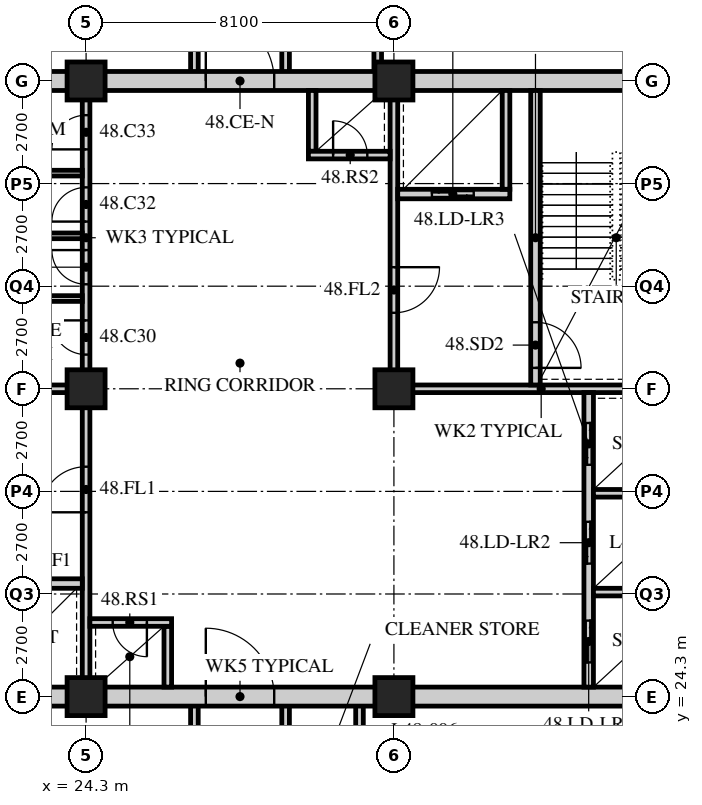
"""IFC4 building model, lengths in metres.
Left out: names, types, materials, properties, quantities, classifications, styles, units other than length and angle.
Written with IfcOpenShell. Run it as: python <this file> out.ifc"""

import sys

from ifc_helpers import new_model, si_unit, direction, frame, frame_2d, origin, origin_2d, place, context, subcontext, project, spatial, rectangle, hollow_rectangle, extrude, element, fill, save


model = new_model("IFC4")
c1 = context("Model", 3, precision=1e-05, world=origin(), true_north=direction((0.0, 1.0)))
c2 = subcontext(c1, "Body", "Model", "MODEL_VIEW")
j1 = project(units=[si_unit("LENGTHUNIT", "METRE"), si_unit("PLANEANGLEUNIT", "RADIAN")], contexts=[c1])
p1 = place(None, origin())
s1 = spatial("IfcSite", under=j1, at=p1, CompositionType="ELEMENT")
p2 = place(p1, origin())
s2 = spatial("IfcBuilding", under=s1, at=p2, CompositionType="ELEMENT")
p3 = place(p2, frame((0.0, 0.0, 188.4)))
s3 = spatial("IfcBuildingStorey", under=s2, at=p3, CompositionType="ELEMENT", Elevation=188.4)
for number, where, z_axis, x_axis in (
    (1, (24.3, 24.3, 0.0), (0.0, 0.0, 1.0), (1.0, 0.0, 0.0)),
    (2, (24.3, 32.4, 0.0), (0.0, 0.0, 1.0), (1.0, 0.0, 0.0)),
    (3, (24.3, 40.5, 0.0), (0.0, 0.0, 1.0), (1.0, 0.0, 0.0)),
    (4, (32.4, 24.3, 0.0), (0.0, 0.0, 1.0), (1.0, 0.0, 0.0)),
    (5, (32.4, 32.4, 0.0), (0.0, 0.0, 1.0), (1.0, 0.0, 0.0)),
    (6, (32.4, 40.5, 0.0), (0.0, 0.0, 1.0), (1.0, 0.0, 0.0)),
):
    element("IfcColumn", number, at=place(p3, frame(where, z_axis=z_axis, x_axis=x_axis)), inside=s3, PredefinedType="COLUMN", context=c2, shape_type="SweptSolid", body=[
        extrude(hollow_rectangle(XDim=1.0, YDim=1.0, WallThickness=0.1, at=origin_2d()), origin(), (0.0, 0.0, 1.0), 3.6),
    ])
for number, where, z_axis, x_axis in (
    (7, (31.494, 20.7, 0.0), (0.0, 0.0, 1.0), (0.0, 1.0, 0.0)),
    (8, (27.15, 20.7, 0.0), (0.0, 0.0, 1.0), (0.0, 1.0, 0.0)),
    (9, (29.55, 20.7, 0.0), (0.0, 0.0, 1.0), (0.0, 1.0, 0.0)),
):
    element("IfcWall", number, at=place(p3, frame(where, z_axis=z_axis, x_axis=x_axis)), inside=s3, PredefinedType="SOLIDWALL", context=c2, shape_type="SweptSolid", body=[
        extrude(rectangle(XDim=3.6, YDim=0.2, at=frame_2d((1.8, 0.0))), origin(), (0.0, 0.0, 1.0), 3.39),
    ])
p4 = place(p3, frame((31.974, 45.45, 0.0), z_axis=(0.0, 0.0, 1.0), x_axis=(0.0, -1.0, 0.0)))
e10 = element("IfcWall", 10, at=p4, inside=s3, PredefinedType="SOLIDWALL", context=c2, shape_type="SweptSolid", body=[
    extrude(rectangle(XDim=4.95, YDim=0.2, at=frame_2d((2.475, 0.0))), origin(), (0.0, 0.0, 1.0), 2.69),
])
for number, where, z_axis, x_axis in (
    (11, (27.15, 40.5, 0.0), (0.0, 0.0, 1.0), (0.0, 1.0, 0.0)),
    (12, (29.55, 40.5, 0.0), (0.0, 0.0, 1.0), (0.0, 1.0, 0.0)),
):
    element("IfcWall", number, at=place(p3, frame(where, z_axis=z_axis, x_axis=x_axis)), inside=s3, PredefinedType="SOLIDWALL", context=c2, shape_type="SweptSolid", body=[
        extrude(rectangle(XDim=4.95, YDim=0.2, at=frame_2d((2.475, 0.0))), origin(), (0.0, 0.0, 1.0), 3.39),
    ])
p5 = place(p3, frame((15.95, 24.3, 0.0), z_axis=(0.0, 0.0, 1.0), x_axis=(1.0, 0.0, 0.0)))
e13 = element("IfcWall", 13, at=p5, inside=s3, PredefinedType="SOLIDWALL", context=c2, shape_type="SweptSolid", body=[
    extrude(rectangle(XDim=24.8, YDim=0.5, at=frame_2d((12.4, 0.0))), origin(), (0.0, 0.0, 1.0), 2.74),
])
p6 = place(p5, frame((11.5, 0.0, 0.0)))
e14 = element("IfcOpeningElement", 14, at=p6, cuts=e13, PredefinedType="OPENING", context=c2, shape_type="SweptSolid", body=[
    extrude(rectangle(XDim=1.8, YDim=2.4, at=frame_2d((0.9, 1.2))), frame((0.0, 0.26, 0.0), z_axis=(0.0, -1.0, 0.0), x_axis=(1.0, 0.0, 0.0)), (0.0, 0.0, 1.0), 0.52),
])
p7 = place(p3, frame((15.95, 40.5, 0.0), z_axis=(0.0, 0.0, 1.0), x_axis=(1.0, 0.0, 0.0)))
e15 = element("IfcWall", 15, at=p7, inside=s3, PredefinedType="SOLIDWALL", context=c2, shape_type="SweptSolid", body=[
    extrude(rectangle(XDim=24.8, YDim=0.5, at=frame_2d((12.4, 0.0))), origin(), (0.0, 0.0, 1.0), 2.74),
])
p8 = place(p7, frame((11.5, 0.0, 0.0)))
e16 = element("IfcOpeningElement", 16, at=p8, cuts=e15, PredefinedType="OPENING", context=c2, shape_type="SweptSolid", body=[
    extrude(rectangle(XDim=1.8, YDim=2.4, at=frame_2d((0.9, 1.2))), frame((0.0, 0.26, 0.0), z_axis=(0.0, -1.0, 0.0), x_axis=(1.0, 0.0, 0.0)), (0.0, 0.0, 1.0), 0.52),
])
p9 = place(p3, frame((16.45, 32.4, 0.0), z_axis=(0.0, 0.0, 1.0), x_axis=(1.0, 0.0, 0.0)))
e17 = element("IfcWall", 17, at=p9, inside=s3, PredefinedType="SOLIDWALL", context=c2, shape_type="SweptSolid", body=[
    extrude(rectangle(XDim=7.95, YDim=0.2, at=frame_2d((3.975, 0.0))), origin(), (0.0, 0.0, 1.0), 2.778),
])
p10 = place(p3, frame((24.3, 24.55, 0.0), z_axis=(0.0, 0.0, 1.0), x_axis=(0.0, 1.0, 0.0)))
e18 = element("IfcWall", 18, at=p10, inside=s3, PredefinedType="SOLIDWALL", context=c2, shape_type="SweptSolid", body=[
    extrude(rectangle(XDim=7.75, YDim=0.2, at=frame_2d((3.875, 0.0))), origin(), (0.0, 0.0, 1.0), 2.778),
])
p11 = place(p10, frame((4.6, 0.0, 0.0)))
e19 = element("IfcOpeningElement", 19, at=p11, cuts=e18, PredefinedType="OPENING", context=c2, shape_type="SweptSolid", body=[
    extrude(rectangle(XDim=1.2, YDim=2.1, at=frame_2d((0.6, 1.05))), frame((0.0, 0.11, 0.0), z_axis=(0.0, -1.0, 0.0), x_axis=(1.0, 0.0, 0.0)), (0.0, 0.0, 1.0), 0.22),
])
p12 = place(p3, frame((21.25, 27.275, 0.0), z_axis=(0.0, 0.0, 1.0), x_axis=(1.0, 0.0, 0.0)))
e20 = element("IfcWall", 20, at=p12, inside=s3, PredefinedType="SOLIDWALL", context=c2, shape_type="SweptSolid", body=[
    extrude(rectangle(XDim=2.95, YDim=0.25, at=frame_2d((1.475, 0.0))), origin(), (0.0, 0.0, 1.0), 3.39),
])
p13 = place(p12, frame((0.95, 0.0, 0.0)))
e21 = element("IfcOpeningElement", 21, at=p13, cuts=e20, PredefinedType="OPENING", context=c2, shape_type="SweptSolid", body=[
    extrude(rectangle(XDim=1.1, YDim=2.4, at=frame_2d((0.55, 1.2))), frame((0.0, 0.135, 0.0), z_axis=(0.0, -1.0, 0.0), x_axis=(1.0, 0.0, 0.0)), (0.0, 0.0, 1.0), 0.27),
])
p14 = place(p3, frame((26.45, 24.55, 0.0), z_axis=(0.0, 0.0, 1.0), x_axis=(0.0, 1.0, 0.0)))
e22 = element("IfcWall", 22, at=p14, inside=s3, PredefinedType="SOLIDWALL", context=c2, shape_type="SweptSolid", body=[
    extrude(rectangle(XDim=1.6, YDim=0.2, at=frame_2d((0.8, 0.0))), origin(), (0.0, 0.0, 1.0), 3.39),
])
p15 = place(p3, frame((24.4, 26.25, 0.0), z_axis=(0.0, 0.0, 1.0), x_axis=(1.0, 0.0, 0.0)))
e23 = element("IfcWall", 23, at=p15, inside=s3, PredefinedType="SOLIDWALL", context=c2, shape_type="SweptSolid", body=[
    extrude(rectangle(XDim=2.15, YDim=0.2, at=frame_2d((1.075, 0.0))), origin(), (0.0, 0.0, 1.0), 3.39),
])
p16 = place(p15, frame((0.6, 0.0, 0.0)))
e24 = element("IfcOpeningElement", 24, at=p16, cuts=e23, PredefinedType="OPENING", context=c2, shape_type="SweptSolid", body=[
    extrude(rectangle(XDim=0.9, YDim=2.1, at=frame_2d((0.45, 1.05))), frame((0.0, 0.11, 0.0), z_axis=(0.0, -1.0, 0.0), x_axis=(1.0, 0.0, 0.0)), (0.0, 0.0, 1.0), 0.22),
])
p17 = place(p3, frame((32.3, 32.4, 0.0), z_axis=(0.0, 0.0, 1.0), x_axis=(1.0, 0.0, 0.0)))
e25 = element("IfcWall", 25, at=p17, inside=s3, PredefinedType="SOLIDWALL", context=c2, shape_type="SweptSolid", body=[
    extrude(rectangle(XDim=7.95, YDim=0.2, at=frame_2d((3.975, 0.0))), origin(), (0.0, 0.0, 1.0), 2.778),
])
p18 = place(p3, frame((32.4, 32.5, 0.0), z_axis=(0.0, 0.0, 1.0), x_axis=(0.0, 1.0, 0.0)))
e26 = element("IfcWall", 26, at=p18, inside=s3, PredefinedType="SOLIDWALL", context=c2, shape_type="SweptSolid", body=[
    extrude(rectangle(XDim=7.75, YDim=0.2, at=frame_2d((3.875, 0.0))), origin(), (0.0, 0.0, 1.0), 2.778),
])
p19 = place(p18, frame((1.9, 0.0, 0.0)))
e27 = element("IfcOpeningElement", 27, at=p19, cuts=e26, PredefinedType="OPENING", context=c2, shape_type="SweptSolid", body=[
    extrude(rectangle(XDim=1.2, YDim=2.1, at=frame_2d((0.6, 1.05))), frame((0.0, 0.11, 0.0), z_axis=(0.0, -1.0, 0.0), x_axis=(1.0, 0.0, 0.0)), (0.0, 0.0, 1.0), 0.22),
])
p20 = place(p3, frame((37.525, 24.55, 0.0), z_axis=(0.0, 0.0, 1.0), x_axis=(0.0, 1.0, 0.0)))
e28 = element("IfcWall", 28, at=p20, inside=s3, PredefinedType="SOLIDWALL", context=c2, shape_type="SweptSolid", body=[
    extrude(rectangle(XDim=7.75, YDim=0.25, at=frame_2d((3.875, 0.0))), origin(), (0.0, 0.0, 1.0), 3.39),
])
p21 = place(p20, frame((0.65, 0.0, 0.0)))
e29 = element("IfcOpeningElement", 29, at=p21, cuts=e28, PredefinedType="OPENING", context=c2, shape_type="SweptSolid", body=[
    extrude(rectangle(XDim=1.1, YDim=2.4, at=frame_2d((0.55, 1.2))), frame((0.0, 0.135, 0.0), z_axis=(0.0, -1.0, 0.0), x_axis=(1.0, 0.0, 0.0)), (0.0, 0.0, 1.0), 0.27),
])
p22 = place(p20, frame((3.25, 0.0, 0.0)))
e30 = element("IfcOpeningElement", 30, at=p22, cuts=e28, PredefinedType="OPENING", context=c2, shape_type="SweptSolid", body=[
    extrude(rectangle(XDim=1.1, YDim=2.4, at=frame_2d((0.55, 1.2))), frame((0.0, 0.135, 0.0), z_axis=(0.0, -1.0, 0.0), x_axis=(1.0, 0.0, 0.0)), (0.0, 0.0, 1.0), 0.27),
])
p23 = place(p20, frame((5.85, 0.0, 0.0)))
e31 = element("IfcOpeningElement", 31, at=p23, cuts=e28, PredefinedType="OPENING", context=c2, shape_type="SweptSolid", body=[
    extrude(rectangle(XDim=1.1, YDim=2.4, at=frame_2d((0.55, 1.2))), frame((0.0, 0.135, 0.0), z_axis=(0.0, -1.0, 0.0), x_axis=(1.0, 0.0, 0.0)), (0.0, 0.0, 1.0), 0.27),
])
for number, where, z_axis, x_axis in (
    (32, (37.65, 27.05, 0.0), (0.0, 0.0, 1.0), (1.0, 0.0, 0.0)),
    (33, (37.65, 29.65, 0.0), (0.0, 0.0, 1.0), (1.0, 0.0, 0.0)),
):
    element("IfcWall", number, at=place(p3, frame(where, z_axis=z_axis, x_axis=x_axis)), inside=s3, PredefinedType="SOLIDWALL", context=c2, shape_type="SweptSolid", body=[
        extrude(rectangle(XDim=2.6, YDim=0.2, at=frame_2d((1.3, 0.0))), origin(), (0.0, 0.0, 1.0), 3.39),
    ])
p24 = place(p3, frame((36.125, 32.5, 0.0), z_axis=(0.0, 0.0, 1.0), x_axis=(0.0, 1.0, 0.0)))
e34 = element("IfcWall", 34, at=p24, inside=s3, PredefinedType="SOLIDWALL", context=c2, shape_type="SweptSolid", body=[
    extrude(rectangle(XDim=7.75, YDim=0.25, at=frame_2d((3.875, 0.0))), origin(), (0.0, 0.0, 1.0), 3.39),
])
p25 = place(p24, frame((0.45, 0.0, 0.0)))
e35 = element("IfcOpeningElement", 35, at=p25, cuts=e34, PredefinedType="OPENING", context=c2, shape_type="SweptSolid", body=[
    extrude(rectangle(XDim=1.2, YDim=2.1, at=frame_2d((0.6, 1.05))), frame((0.0, 0.135, 0.0), z_axis=(0.0, -1.0, 0.0), x_axis=(1.0, 0.0, 0.0)), (0.0, 0.0, 1.0), 0.27),
])
p26 = place(p3, frame((32.5, 37.525, 0.0), z_axis=(0.0, 0.0, 1.0), x_axis=(1.0, 0.0, 0.0)))
e36 = element("IfcWall", 36, at=p26, inside=s3, PredefinedType="SOLIDWALL", context=c2, shape_type="SweptSolid", body=[
    extrude(rectangle(XDim=2.95, YDim=0.25, at=frame_2d((1.475, 0.0))), origin(), (0.0, 0.0, 1.0), 3.39),
])
p27 = place(p26, frame((0.9, 0.0, 0.0)))
e37 = element("IfcOpeningElement", 37, at=p27, cuts=e36, PredefinedType="OPENING", context=c2, shape_type="SweptSolid", body=[
    extrude(rectangle(XDim=1.1, YDim=2.4, at=frame_2d((0.55, 1.2))), frame((0.0, 0.135, 0.0), z_axis=(0.0, -1.0, 0.0), x_axis=(1.0, 0.0, 0.0)), (0.0, 0.0, 1.0), 0.27),
])
p28 = place(p3, frame((35.35, 37.65, 0.0), z_axis=(0.0, 0.0, 1.0), x_axis=(0.0, 1.0, 0.0)))
e38 = element("IfcWall", 38, at=p28, inside=s3, PredefinedType="SOLIDWALL", context=c2, shape_type="SweptSolid", body=[
    extrude(rectangle(XDim=2.6, YDim=0.2, at=frame_2d((1.3, 0.0))), origin(), (0.0, 0.0, 1.0), 3.39),
])
p29 = place(p3, frame((30.25, 38.65, 0.0), z_axis=(0.0, 0.0, 1.0), x_axis=(0.0, 1.0, 0.0)))
e39 = element("IfcWall", 39, at=p29, inside=s3, PredefinedType="SOLIDWALL", context=c2, shape_type="SweptSolid", body=[
    extrude(rectangle(XDim=1.6, YDim=0.2, at=frame_2d((0.8, 0.0))), origin(), (0.0, 0.0, 1.0), 3.39),
])
p30 = place(p3, frame((30.15, 38.55, 0.0), z_axis=(0.0, 0.0, 1.0), x_axis=(1.0, 0.0, 0.0)))
e40 = element("IfcWall", 40, at=p30, inside=s3, PredefinedType="SOLIDWALL", context=c2, shape_type="SweptSolid", body=[
    extrude(rectangle(XDim=2.15, YDim=0.2, at=frame_2d((1.075, 0.0))), origin(), (0.0, 0.0, 1.0), 3.39),
])
p31 = place(p30, frame((0.65, 0.0, 0.0)))
e41 = element("IfcOpeningElement", 41, at=p31, cuts=e40, PredefinedType="OPENING", context=c2, shape_type="SweptSolid", body=[
    extrude(rectangle(XDim=0.9, YDim=2.1, at=frame_2d((0.45, 1.05))), frame((0.0, 0.11, 0.0), z_axis=(0.0, -1.0, 0.0), x_axis=(1.0, 0.0, 0.0)), (0.0, 0.0, 1.0), 0.22),
])
p32 = place(p3, frame((24.3, 32.5, 0.0), z_axis=(0.0, 0.0, 1.0), x_axis=(0.0, 1.0, 0.0)))
e42 = element("IfcWall", 42, at=p32, inside=s3, PredefinedType="PARTITIONING", context=c2, shape_type="SweptSolid", body=[
    extrude(rectangle(XDim=7.75, YDim=0.2, at=frame_2d((3.875, 0.0))), origin(), (0.0, 0.0, 1.0), 2.778),
])
p33 = place(p32, frame((0.8, 0.0, 0.0)))
e43 = element("IfcOpeningElement", 43, at=p33, cuts=e42, PredefinedType="OPENING", context=c2, shape_type="SweptSolid", body=[
    extrude(rectangle(XDim=0.9, YDim=2.1, at=frame_2d((0.45, 1.05))), frame((0.0, 0.11, 0.0), z_axis=(0.0, -1.0, 0.0), x_axis=(1.0, 0.0, 0.0)), (0.0, 0.0, 1.0), 0.22),
])
p34 = place(p32, frame((2.65, 0.0, 0.0)))
e44 = element("IfcOpeningElement", 44, at=p34, cuts=e42, PredefinedType="OPENING", context=c2, shape_type="SweptSolid", body=[
    extrude(rectangle(XDim=0.9, YDim=2.1, at=frame_2d((0.45, 1.05))), frame((0.0, 0.11, 0.0), z_axis=(0.0, -1.0, 0.0), x_axis=(1.0, 0.0, 0.0)), (0.0, 0.0, 1.0), 0.22),
])
p35 = place(p32, frame((4.3, 0.0, 0.0)))
e45 = element("IfcOpeningElement", 45, at=p35, cuts=e42, PredefinedType="OPENING", context=c2, shape_type="SweptSolid", body=[
    extrude(rectangle(XDim=0.9, YDim=2.1, at=frame_2d((0.45, 1.05))), frame((0.0, 0.11, 0.0), z_axis=(0.0, -1.0, 0.0), x_axis=(1.0, 0.0, 0.0)), (0.0, 0.0, 1.0), 0.22),
])
p36 = place(p32, frame((6.2, 0.0, 0.0)))
e46 = element("IfcOpeningElement", 46, at=p36, cuts=e42, PredefinedType="OPENING", context=c2, shape_type="SweptSolid", body=[
    extrude(rectangle(XDim=0.9, YDim=2.1, at=frame_2d((0.45, 1.05))), frame((0.0, 0.11, 0.0), z_axis=(0.0, -1.0, 0.0), x_axis=(1.0, 0.0, 0.0)), (0.0, 0.0, 1.0), 0.22),
])
for number, where, z_axis, x_axis in (
    (47, (21.05, 34.775, 0.0), (0.0, 0.0, 1.0), (1.0, 0.0, 0.0)),
    (48, (21.05, 36.425, 0.0), (0.0, 0.0, 1.0), (1.0, 0.0, 0.0)),
):
    element("IfcWall", number, at=place(p3, frame(where, z_axis=z_axis, x_axis=x_axis)), inside=s3, PredefinedType="PARTITIONING", context=c2, shape_type="SweptSolid", body=[
        extrude(rectangle(XDim=3.15, YDim=0.15, at=frame_2d((1.575, 0.0))), origin(), (0.0, 0.0, 1.0), 3.39),
    ])
p37 = place(p3, frame((21.2, 38.075, 0.0), z_axis=(0.0, 0.0, 1.0), x_axis=(1.0, 0.0, 0.0)))
e49 = element("IfcWall", 49, at=p37, inside=s3, PredefinedType="PARTITIONING", context=c2, shape_type="SweptSolid", body=[
    extrude(rectangle(XDim=3.0, YDim=0.15, at=frame_2d((1.5, 0.0))), origin(), (0.0, 0.0, 1.0), 3.39),
])
p38 = place(p33, origin())
e50 = element("IfcDoor", 50, at=p38, inside=s3, OperationType="SINGLE_SWING_RIGHT", PredefinedType="DOOR", context=c2, shape_type="SweptSolid", body=[
    extrude(rectangle(XDim=0.9, YDim=2.1, at=frame_2d((0.45, 1.05))), frame((0.0, 0.025, 0.0), z_axis=(0.0, -1.0, 0.0), x_axis=(1.0, 0.0, 0.0)), (0.0, 0.0, 1.0), 0.05),
])
fill(e43, e50)
p39 = place(p34, origin())
e51 = element("IfcDoor", 51, at=p39, inside=s3, OperationType="SINGLE_SWING_RIGHT", PredefinedType="DOOR", context=c2, shape_type="SweptSolid", body=[
    extrude(rectangle(XDim=0.9, YDim=2.1, at=frame_2d((0.45, 1.05))), frame((0.0, 0.025, 0.0), z_axis=(0.0, -1.0, 0.0), x_axis=(1.0, 0.0, 0.0)), (0.0, 0.0, 1.0), 0.05),
])
fill(e44, e51)
p40 = place(p35, origin())
e52 = element("IfcDoor", 52, at=p40, inside=s3, OperationType="SINGLE_SWING_LEFT", PredefinedType="DOOR", context=c2, shape_type="SweptSolid", body=[
    extrude(rectangle(XDim=0.9, YDim=2.1, at=frame_2d((0.45, 1.05))), frame((0.0, 0.025, 0.0), z_axis=(0.0, -1.0, 0.0), x_axis=(1.0, 0.0, 0.0)), (0.0, 0.0, 1.0), 0.05),
])
fill(e45, e52)
p41 = place(p36, origin())
e53 = element("IfcDoor", 53, at=p41, inside=s3, OperationType="SINGLE_SWING_LEFT", PredefinedType="DOOR", context=c2, shape_type="SweptSolid", body=[
    extrude(rectangle(XDim=0.9, YDim=2.1, at=frame_2d((0.45, 1.05))), frame((0.0, 0.025, 0.0), z_axis=(0.0, -1.0, 0.0), x_axis=(1.0, 0.0, 0.0)), (0.0, 0.0, 1.0), 0.05),
])
fill(e46, e53)
p42 = place(p11, origin())
e54 = element("IfcDoor", 54, at=p42, inside=s3, OperationType="SINGLE_SWING_LEFT", PredefinedType="DOOR", context=c2, shape_type="SweptSolid", body=[
    extrude(rectangle(XDim=1.2, YDim=2.1, at=frame_2d((0.6, 1.05))), frame((0.0, 0.025, 0.0), z_axis=(0.0, -1.0, 0.0), x_axis=(1.0, 0.0, 0.0)), (0.0, 0.0, 1.0), 0.05),
])
fill(e19, e54)
p43 = place(p16, origin())
e55 = element("IfcDoor", 55, at=p43, inside=s3, OperationType="SINGLE_SWING_LEFT", PredefinedType="DOOR", context=c2, shape_type="SweptSolid", body=[
    extrude(rectangle(XDim=0.9, YDim=2.1, at=frame_2d((0.45, 1.05))), frame((0.0, 0.025, 0.0), z_axis=(0.0, -1.0, 0.0), x_axis=(1.0, 0.0, 0.0)), (0.0, 0.0, 1.0), 0.05),
])
fill(e24, e55)
p44 = place(p25, origin())
e56 = element("IfcDoor", 56, at=p44, inside=s3, OperationType="SINGLE_SWING_RIGHT", PredefinedType="DOOR", context=c2, shape_type="SweptSolid", body=[
    extrude(rectangle(XDim=1.2, YDim=2.1, at=frame_2d((0.6, 1.05))), frame((0.0, 0.025, 0.0), z_axis=(0.0, -1.0, 0.0), x_axis=(1.0, 0.0, 0.0)), (0.0, 0.0, 1.0), 0.05),
])
fill(e35, e56)
p45 = place(p19, origin())
e57 = element("IfcDoor", 57, at=p45, inside=s3, OperationType="SINGLE_SWING_LEFT", PredefinedType="DOOR", context=c2, shape_type="SweptSolid", body=[
    extrude(rectangle(XDim=1.2, YDim=2.1, at=frame_2d((0.6, 1.05))), frame((0.0, 0.025, 0.0), z_axis=(0.0, -1.0, 0.0), x_axis=(1.0, 0.0, 0.0)), (0.0, 0.0, 1.0), 0.05),
])
fill(e27, e57)
p46 = place(p31, origin())
e58 = element("IfcDoor", 58, at=p46, inside=s3, OperationType="SINGLE_SWING_LEFT", PredefinedType="DOOR", context=c2, shape_type="SweptSolid", body=[
    extrude(rectangle(XDim=0.9, YDim=2.1, at=frame_2d((0.45, 1.05))), frame((0.0, 0.025, 0.0), z_axis=(0.0, -1.0, 0.0), x_axis=(1.0, 0.0, 0.0)), (0.0, 0.0, 1.0), 0.05),
])
fill(e41, e58)
p47 = place(p21, origin())
e59 = element("IfcDoor", 59, at=p47, inside=s3, OperationType="DOUBLE_DOOR_SLIDING", PredefinedType="DOOR", context=c2, shape_type="SweptSolid", body=[
    extrude(rectangle(XDim=1.1, YDim=2.4, at=frame_2d((0.55, 1.2))), frame((0.0, 0.025, 0.0), z_axis=(0.0, -1.0, 0.0), x_axis=(1.0, 0.0, 0.0)), (0.0, 0.0, 1.0), 0.05),
])
fill(e29, e59)
p48 = place(p22, origin())
e60 = element("IfcDoor", 60, at=p48, inside=s3, OperationType="DOUBLE_DOOR_SLIDING", PredefinedType="DOOR", context=c2, shape_type="SweptSolid", body=[
    extrude(rectangle(XDim=1.1, YDim=2.4, at=frame_2d((0.55, 1.2))), frame((0.0, 0.025, 0.0), z_axis=(0.0, -1.0, 0.0), x_axis=(1.0, 0.0, 0.0)), (0.0, 0.0, 1.0), 0.05),
])
fill(e30, e60)
p49 = place(p23, origin())
e61 = element("IfcDoor", 61, at=p49, inside=s3, OperationType="DOUBLE_DOOR_SLIDING", PredefinedType="DOOR", context=c2, shape_type="SweptSolid", body=[
    extrude(rectangle(XDim=1.1, YDim=2.4, at=frame_2d((0.55, 1.2))), frame((0.0, 0.025, 0.0), z_axis=(0.0, -1.0, 0.0), x_axis=(1.0, 0.0, 0.0)), (0.0, 0.0, 1.0), 0.05),
])
fill(e31, e61)
p50 = place(p27, origin())
e62 = element("IfcDoor", 62, at=p50, inside=s3, OperationType="DOUBLE_DOOR_SLIDING", PredefinedType="DOOR", context=c2, shape_type="SweptSolid", body=[
    extrude(rectangle(XDim=1.1, YDim=2.4, at=frame_2d((0.55, 1.2))), frame((0.0, 0.025, 0.0), z_axis=(0.0, -1.0, 0.0), x_axis=(1.0, 0.0, 0.0)), (0.0, 0.0, 1.0), 0.05),
])
fill(e37, e62)
p51 = place(p6, origin())
e63 = element("IfcDoor", 63, at=p51, inside=s3, OperationType="DOUBLE_DOOR_SINGLE_SWING", PredefinedType="DOOR", context=c2, shape_type="SweptSolid", body=[
    extrude(rectangle(XDim=1.8, YDim=2.4, at=frame_2d((0.9, 1.2))), frame((0.0, 0.025, 0.0), z_axis=(0.0, -1.0, 0.0), x_axis=(1.0, 0.0, 0.0)), (0.0, 0.0, 1.0), 0.05),
])
fill(e14, e63)
p52 = place(p8, origin())
e64 = element("IfcDoor", 64, at=p52, inside=s3, OperationType="DOUBLE_DOOR_SINGLE_SWING", PredefinedType="DOOR", context=c2, shape_type="SweptSolid", body=[
    extrude(rectangle(XDim=1.8, YDim=2.4, at=frame_2d((0.9, 1.2))), frame((0.0, 0.025, 0.0), z_axis=(0.0, -1.0, 0.0), x_axis=(1.0, 0.0, 0.0)), (0.0, 0.0, 1.0), 0.05),
])
fill(e16, e64)
save(model, sys.argv[1])
